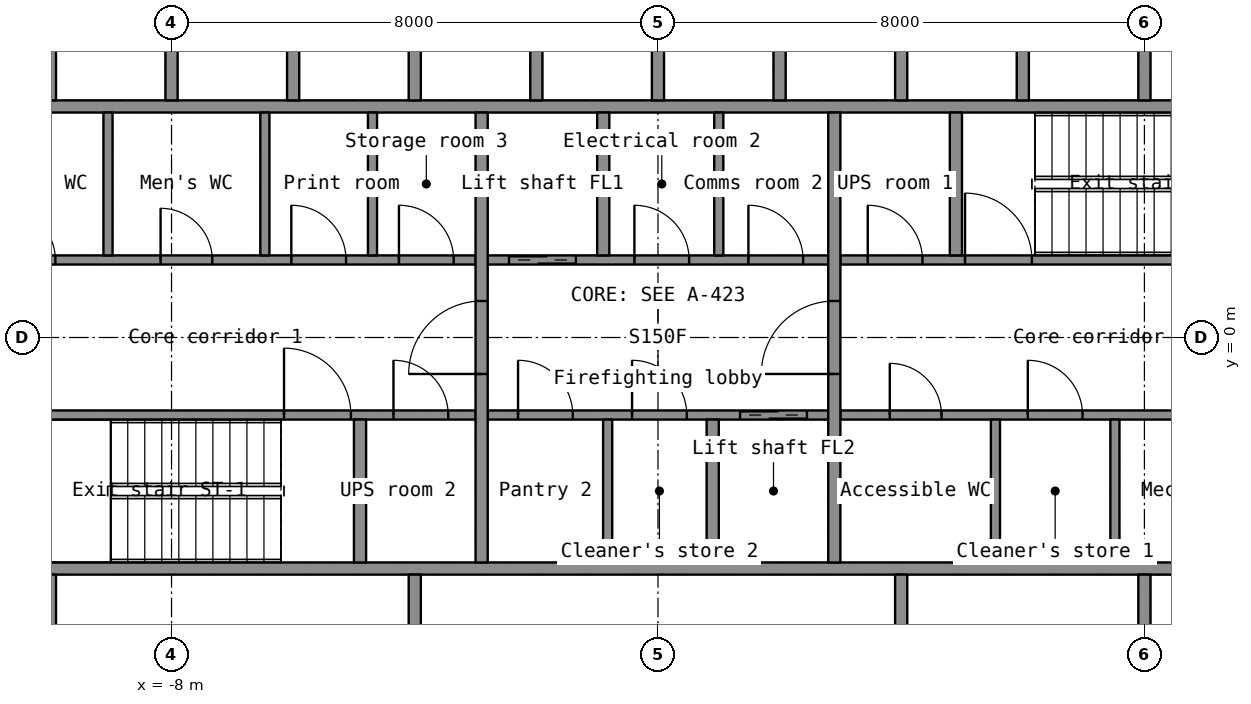
"""IFC4 building model, lengths in metres.
Left out: names, types, materials, properties, quantities, classifications, styles, units other than length and angle.
Written with IfcOpenShell. Run it as: python <this file> out.ifc"""

import sys

from ifc_helpers import new_model, si_unit, direction, frame, frame_2d, origin, place, context, subcontext, project, spatial, rectangle, extrude, element, fill, save


model = new_model("IFC4")
c1 = context("Model", 3, precision=1e-05, world=origin(), true_north=direction((0.0, 1.0)))
c2 = subcontext(c1, "Body", "Model", "MODEL_VIEW")
j1 = project(units=[si_unit("LENGTHUNIT", "METRE"), si_unit("PLANEANGLEUNIT", "RADIAN")], contexts=[c1])
p1 = place(None, origin())
s1 = spatial("IfcSite", under=j1, at=p1, CompositionType="ELEMENT")
p2 = place(p1, origin())
s2 = spatial("IfcBuilding", under=s1, at=p2, CompositionType="ELEMENT")
p3 = place(p2, frame((0.0, 0.0, 171.9)))
s3 = spatial("IfcBuildingStorey", under=s2, at=p3, CompositionType="ELEMENT", Elevation=171.9)
for number, where, z_axis, x_axis in (
    (1, (-11.55, -3.8, 0.0), (0.0, 0.0, 1.0), (1.0, 0.0, 0.0)),
    (2, (-11.55, 3.8, 0.0), (0.0, 0.0, 1.0), (1.0, 0.0, 0.0)),
):
    element("IfcWall", number, at=place(p3, frame(where, z_axis=z_axis, x_axis=x_axis)), inside=s3, PredefinedType="SHEAR", context=c2, shape_type="SweptSolid", body=[
        extrude(rectangle(XDim=23.1, YDim=0.2, at=frame_2d((11.55, 0.0))), origin(), (0.0, 0.0, 1.0), 3.3),
    ])
for number, where, z_axis, x_axis in (
    (3, (-10.0, -6.75, 0.0), (0.0, 0.0, 1.0), (0.0, 1.0, 0.0)),
    (4, (8.0, -6.75, 0.0), (0.0, 0.0, 1.0), (0.0, 1.0, 0.0)),
):
    element("IfcWall", number, at=place(p3, frame(where, z_axis=z_axis, x_axis=x_axis)), inside=s3, PredefinedType="SHEAR", context=c2, shape_type="SweptSolid", body=[
        extrude(rectangle(XDim=2.85, YDim=0.2, at=frame_2d((1.425, 0.0))), origin(), (0.0, 0.0, 1.0), 3.3),
    ])
for number, where, z_axis, x_axis in (
    (5, (-4.0, -6.75, 0.0), (0.0, 0.0, 1.0), (0.0, 1.0, 0.0)),
    (6, (4.0, -6.75, 0.0), (0.0, 0.0, 1.0), (0.0, 1.0, 0.0)),
):
    element("IfcWall", number, at=place(p3, frame(where, z_axis=z_axis, x_axis=x_axis)), inside=s3, PredefinedType="PARTITIONING", context=c2, shape_type="SweptSolid", body=[
        extrude(rectangle(XDim=2.85, YDim=0.2, at=frame_2d((1.425, 0.0))), origin(), (0.0, 0.0, 1.0), 3.3),
    ])
for number, where, z_axis, x_axis in (
    (7, (-10.0, 3.9, 0.0), (0.0, 0.0, 1.0), (0.0, 1.0, 0.0)),
    (8, (-8.0, 3.9, 0.0), (0.0, 0.0, 1.0), (0.0, 1.0, 0.0)),
    (9, (-6.0, 3.9, 0.0), (0.0, 0.0, 1.0), (0.0, 1.0, 0.0)),
    (10, (-4.0, 3.9, 0.0), (0.0, 0.0, 1.0), (0.0, 1.0, 0.0)),
    (11, (-2.0, 3.9, 0.0), (0.0, 0.0, 1.0), (0.0, 1.0, 0.0)),
    (12, (0.0, 3.9, 0.0), (0.0, 0.0, 1.0), (0.0, 1.0, 0.0)),
    (13, (2.0, 3.9, 0.0), (0.0, 0.0, 1.0), (0.0, 1.0, 0.0)),
    (14, (4.0, 3.9, 0.0), (0.0, 0.0, 1.0), (0.0, 1.0, 0.0)),
    (15, (6.0, 3.9, 0.0), (0.0, 0.0, 1.0), (0.0, 1.0, 0.0)),
    (16, (8.0, 3.9, 0.0), (0.0, 0.0, 1.0), (0.0, 1.0, 0.0)),
):
    element("IfcWall", number, at=place(p3, frame(where, z_axis=z_axis, x_axis=x_axis)), inside=s3, PredefinedType="SHEAR", context=c2, shape_type="SweptSolid", body=[
        extrude(rectangle(XDim=2.85, YDim=0.2, at=frame_2d((1.425, 0.0))), origin(), (0.0, 0.0, 1.0), 3.3),
    ])
p4 = place(p3, frame((-11.55, -1.275, 0.0), z_axis=(0.0, 0.0, 1.0), x_axis=(1.0, 0.0, 0.0)))
e17 = element("IfcWall", 17, at=p4, inside=s3, PredefinedType="SHEAR", context=c2, shape_type="SweptSolid", body=[
    extrude(rectangle(XDim=8.55, YDim=0.15, at=frame_2d((4.275, 0.0))), origin(), (0.0, 0.0, 1.0), 3.3),
])
p5 = place(p4, frame((5.4, 0.0, 0.0)))
e18 = element("IfcOpeningElement", 18, at=p5, cuts=e17, PredefinedType="OPENING", context=c2, shape_type="SweptSolid", body=[
    extrude(rectangle(XDim=1.1, YDim=2.15, at=frame_2d((0.55, 1.075))), frame((0.0, 0.085, 0.0), z_axis=(0.0, -1.0, 0.0), x_axis=(1.0, 0.0, 0.0)), (0.0, 0.0, 1.0), 0.17),
])
p6 = place(p4, frame((7.2, 0.0, 0.0)))
e19 = element("IfcOpeningElement", 19, at=p6, cuts=e17, PredefinedType="OPENING", context=c2, shape_type="SweptSolid", body=[
    extrude(rectangle(XDim=0.9, YDim=2.1, at=frame_2d((0.45, 1.05))), frame((0.0, 0.085, 0.0), z_axis=(0.0, -1.0, 0.0), x_axis=(1.0, 0.0, 0.0)), (0.0, 0.0, 1.0), 0.17),
])
p7 = place(p3, frame((-2.8, -1.275, 0.0), z_axis=(0.0, 0.0, 1.0), x_axis=(1.0, 0.0, 0.0)))
e20 = element("IfcWall", 20, at=p7, inside=s3, PredefinedType="SHEAR", context=c2, shape_type="SweptSolid", body=[
    extrude(rectangle(XDim=5.6, YDim=0.15, at=frame_2d((2.8, 0.0))), origin(), (0.0, 0.0, 1.0), 3.3),
])
p8 = place(p7, frame((4.15, 0.0, 0.0)))
e21 = element("IfcOpeningElement", 21, at=p8, cuts=e20, PredefinedType="OPENING", context=c2, shape_type="SweptSolid", body=[
    extrude(rectangle(XDim=1.1, YDim=2.2, at=frame_2d((0.55, 1.1))), frame((0.0, 0.085, 0.0), z_axis=(0.0, -1.0, 0.0), x_axis=(1.0, 0.0, 0.0)), (0.0, 0.0, 1.0), 0.17),
])
p9 = place(p7, frame((0.499, 0.0, 0.0)))
e22 = element("IfcOpeningElement", 22, at=p9, cuts=e20, PredefinedType="OPENING", context=c2, shape_type="SweptSolid", body=[
    extrude(rectangle(XDim=0.9, YDim=2.1, at=frame_2d((0.45, 1.05))), frame((0.0, 0.085, 0.0), z_axis=(0.0, -1.0, 0.0), x_axis=(1.0, 0.0, 0.0)), (0.0, 0.0, 1.0), 0.17),
])
p10 = place(p7, frame((2.374, 0.0, 0.0)))
e23 = element("IfcOpeningElement", 23, at=p10, cuts=e20, PredefinedType="OPENING", context=c2, shape_type="SweptSolid", body=[
    extrude(rectangle(XDim=0.9, YDim=2.1, at=frame_2d((0.45, 1.05))), frame((0.0, 0.085, 0.0), z_axis=(0.0, -1.0, 0.0), x_axis=(1.0, 0.0, 0.0)), (0.0, 0.0, 1.0), 0.17),
])
p11 = place(p3, frame((3.0, -1.275, 0.0), z_axis=(0.0, 0.0, 1.0), x_axis=(1.0, 0.0, 0.0)))
e24 = element("IfcWall", 24, at=p11, inside=s3, PredefinedType="PARTITIONING", context=c2, shape_type="SweptSolid", body=[
    extrude(rectangle(XDim=8.55, YDim=0.15, at=frame_2d((4.275, 0.0))), origin(), (0.0, 0.0, 1.0), 3.3),
])
p12 = place(p11, frame((0.812, 0.0, 0.0)))
e25 = element("IfcOpeningElement", 25, at=p12, cuts=e24, PredefinedType="OPENING", context=c2, shape_type="SweptSolid", body=[
    extrude(rectangle(XDim=0.85, YDim=2.1, at=frame_2d((0.425, 1.05))), frame((0.0, 0.085, 0.0), z_axis=(0.0, -1.0, 0.0), x_axis=(1.0, 0.0, 0.0)), (0.0, 0.0, 1.0), 0.17),
])
p13 = place(p11, frame((3.083, 0.0, 0.0)))
e26 = element("IfcOpeningElement", 26, at=p13, cuts=e24, PredefinedType="OPENING", context=c2, shape_type="SweptSolid", body=[
    extrude(rectangle(XDim=0.9, YDim=2.1, at=frame_2d((0.45, 1.05))), frame((0.0, 0.085, 0.0), z_axis=(0.0, -1.0, 0.0), x_axis=(1.0, 0.0, 0.0)), (0.0, 0.0, 1.0), 0.17),
])
p14 = place(p11, frame((6.12, 0.0, 0.0)))
e27 = element("IfcOpeningElement", 27, at=p14, cuts=e24, PredefinedType="OPENING", context=c2, shape_type="SweptSolid", body=[
    extrude(rectangle(XDim=0.9, YDim=2.1, at=frame_2d((0.45, 1.05))), frame((0.0, 0.085, 0.0), z_axis=(0.0, -1.0, 0.0), x_axis=(1.0, 0.0, 0.0)), (0.0, 0.0, 1.0), 0.17),
])
p15 = place(p3, frame((-11.55, 1.275, 0.0), z_axis=(0.0, 0.0, 1.0), x_axis=(1.0, 0.0, 0.0)))
e28 = element("IfcWall", 28, at=p15, inside=s3, PredefinedType="PARTITIONING", context=c2, shape_type="SweptSolid", body=[
    extrude(rectangle(XDim=8.55, YDim=0.15, at=frame_2d((4.275, 0.0))), origin(), (0.0, 0.0, 1.0), 3.3),
])
p16 = place(p15, frame((0.79, 0.0, 0.0)))
e29 = element("IfcOpeningElement", 29, at=p16, cuts=e28, PredefinedType="OPENING", context=c2, shape_type="SweptSolid", body=[
    extrude(rectangle(XDim=0.85, YDim=2.1, at=frame_2d((0.425, 1.05))), frame((0.0, 0.085, 0.0), z_axis=(0.0, -1.0, 0.0), x_axis=(1.0, 0.0, 0.0)), (0.0, 0.0, 1.0), 0.17),
])
p17 = place(p15, frame((3.37, 0.0, 0.0)))
e30 = element("IfcOpeningElement", 30, at=p17, cuts=e28, PredefinedType="OPENING", context=c2, shape_type="SweptSolid", body=[
    extrude(rectangle(XDim=0.85, YDim=2.1, at=frame_2d((0.425, 1.05))), frame((0.0, 0.085, 0.0), z_axis=(0.0, -1.0, 0.0), x_axis=(1.0, 0.0, 0.0)), (0.0, 0.0, 1.0), 0.17),
])
p18 = place(p15, frame((5.52, 0.0, 0.0)))
e31 = element("IfcOpeningElement", 31, at=p18, cuts=e28, PredefinedType="OPENING", context=c2, shape_type="SweptSolid", body=[
    extrude(rectangle(XDim=0.9, YDim=2.1, at=frame_2d((0.45, 1.05))), frame((0.0, 0.085, 0.0), z_axis=(0.0, -1.0, 0.0), x_axis=(1.0, 0.0, 0.0)), (0.0, 0.0, 1.0), 0.17),
])
p19 = place(p15, frame((7.29, 0.0, 0.0)))
e32 = element("IfcOpeningElement", 32, at=p19, cuts=e28, PredefinedType="OPENING", context=c2, shape_type="SweptSolid", body=[
    extrude(rectangle(XDim=0.9, YDim=2.1, at=frame_2d((0.45, 1.05))), frame((0.0, 0.085, 0.0), z_axis=(0.0, -1.0, 0.0), x_axis=(1.0, 0.0, 0.0)), (0.0, 0.0, 1.0), 0.17),
])
p20 = place(p3, frame((-2.8, 1.275, 0.0), z_axis=(0.0, 0.0, 1.0), x_axis=(1.0, 0.0, 0.0)))
e33 = element("IfcWall", 33, at=p20, inside=s3, PredefinedType="SHEAR", context=c2, shape_type="SweptSolid", body=[
    extrude(rectangle(XDim=5.6, YDim=0.15, at=frame_2d((2.8, 0.0))), origin(), (0.0, 0.0, 1.0), 3.3),
])
p21 = place(p20, frame((0.35, 0.0, 0.0)))
e34 = element("IfcOpeningElement", 34, at=p21, cuts=e33, PredefinedType="OPENING", context=c2, shape_type="SweptSolid", body=[
    extrude(rectangle(XDim=1.1, YDim=2.2, at=frame_2d((0.55, 1.1))), frame((0.0, 0.085, 0.0), z_axis=(0.0, -1.0, 0.0), x_axis=(1.0, 0.0, 0.0)), (0.0, 0.0, 1.0), 0.17),
])
p22 = place(p20, frame((2.413, 0.0, 0.0)))
e35 = element("IfcOpeningElement", 35, at=p22, cuts=e33, PredefinedType="OPENING", context=c2, shape_type="SweptSolid", body=[
    extrude(rectangle(XDim=0.9, YDim=2.1, at=frame_2d((0.45, 1.05))), frame((0.0, 0.085, 0.0), z_axis=(0.0, -1.0, 0.0), x_axis=(1.0, 0.0, 0.0)), (0.0, 0.0, 1.0), 0.17),
])
p23 = place(p20, frame((4.288, 0.0, 0.0)))
e36 = element("IfcOpeningElement", 36, at=p23, cuts=e33, PredefinedType="OPENING", context=c2, shape_type="SweptSolid", body=[
    extrude(rectangle(XDim=0.9, YDim=2.1, at=frame_2d((0.45, 1.05))), frame((0.0, 0.085, 0.0), z_axis=(0.0, -1.0, 0.0), x_axis=(1.0, 0.0, 0.0)), (0.0, 0.0, 1.0), 0.17),
])
p24 = place(p3, frame((3.0, 1.275, 0.0), z_axis=(0.0, 0.0, 1.0), x_axis=(1.0, 0.0, 0.0)))
e37 = element("IfcWall", 37, at=p24, inside=s3, PredefinedType="SHEAR", context=c2, shape_type="SweptSolid", body=[
    extrude(rectangle(XDim=8.55, YDim=0.15, at=frame_2d((4.275, 0.0))), origin(), (0.0, 0.0, 1.0), 3.3),
])
p25 = place(p24, frame((2.05, 0.0, 0.0)))
e38 = element("IfcOpeningElement", 38, at=p25, cuts=e37, PredefinedType="OPENING", context=c2, shape_type="SweptSolid", body=[
    extrude(rectangle(XDim=1.1, YDim=2.15, at=frame_2d((0.55, 1.075))), frame((0.0, 0.085, 0.0), z_axis=(0.0, -1.0, 0.0), x_axis=(1.0, 0.0, 0.0)), (0.0, 0.0, 1.0), 0.17),
])
p26 = place(p24, frame((0.45, 0.0, 0.0)))
e39 = element("IfcOpeningElement", 39, at=p26, cuts=e37, PredefinedType="OPENING", context=c2, shape_type="SweptSolid", body=[
    extrude(rectangle(XDim=0.9, YDim=2.1, at=frame_2d((0.45, 1.05))), frame((0.0, 0.085, 0.0), z_axis=(0.0, -1.0, 0.0), x_axis=(1.0, 0.0, 0.0)), (0.0, 0.0, 1.0), 0.17),
])
p27 = place(p3, frame((-2.9, -3.7, 0.0), z_axis=(0.0, 0.0, 1.0), x_axis=(0.0, 1.0, 0.0)))
e40 = element("IfcWall", 40, at=p27, inside=s3, PredefinedType="SHEAR", context=c2, shape_type="SweptSolid", body=[
    extrude(rectangle(XDim=7.4, YDim=0.2, at=frame_2d((3.7, 0.0))), origin(), (0.0, 0.0, 1.0), 3.3),
])
p28 = place(p27, frame((3.1, 0.0, 0.0)))
e41 = element("IfcOpeningElement", 41, at=p28, cuts=e40, PredefinedType="OPENING", context=c2, shape_type="SweptSolid", body=[
    extrude(rectangle(XDim=1.2, YDim=2.2, at=frame_2d((0.6, 1.1))), frame((0.0, 0.11, 0.0), z_axis=(0.0, -1.0, 0.0), x_axis=(1.0, 0.0, 0.0)), (0.0, 0.0, 1.0), 0.22),
])
p29 = place(p3, frame((2.9, -3.7, 0.0), z_axis=(0.0, 0.0, 1.0), x_axis=(0.0, 1.0, 0.0)))
e42 = element("IfcWall", 42, at=p29, inside=s3, PredefinedType="SHEAR", context=c2, shape_type="SweptSolid", body=[
    extrude(rectangle(XDim=7.4, YDim=0.2, at=frame_2d((3.7, 0.0))), origin(), (0.0, 0.0, 1.0), 3.3),
])
p30 = place(p29, frame((3.1, 0.0, 0.0)))
e43 = element("IfcOpeningElement", 43, at=p30, cuts=e42, PredefinedType="OPENING", context=c2, shape_type="SweptSolid", body=[
    extrude(rectangle(XDim=1.2, YDim=2.2, at=frame_2d((0.6, 1.1))), frame((0.0, 0.11, 0.0), z_axis=(0.0, -1.0, 0.0), x_axis=(1.0, 0.0, 0.0)), (0.0, 0.0, 1.0), 0.22),
])
for number, where, z_axis, x_axis in (
    (44, (-0.9, 1.35, 0.0), (0.0, 0.0, 1.0), (0.0, 1.0, 0.0)),
    (45, (0.9, -3.7, 0.0), (0.0, 0.0, 1.0), (0.0, 1.0, 0.0)),
    (46, (-4.9, -3.7, 0.0), (0.0, 0.0, 1.0), (0.0, 1.0, 0.0)),
    (47, (4.9, 1.35, 0.0), (0.0, 0.0, 1.0), (0.0, 1.0, 0.0)),
):
    element("IfcWall", number, at=place(p3, frame(where, z_axis=z_axis, x_axis=x_axis)), inside=s3, PredefinedType="SHEAR", context=c2, shape_type="SweptSolid", body=[
        extrude(rectangle(XDim=2.35, YDim=0.2, at=frame_2d((1.175, 0.0))), origin(), (0.0, 0.0, 1.0), 3.3),
    ])
for number, where, z_axis, x_axis in (
    (48, (-9.045, 1.35, 0.0), (0.0, 0.0, 1.0), (0.0, 1.0, 0.0)),
    (49, (-6.465, 1.35, 0.0), (0.0, 0.0, 1.0), (0.0, 1.0, 0.0)),
    (50, (-4.695, 1.35, 0.0), (0.0, 0.0, 1.0), (0.0, 1.0, 0.0)),
    (51, (5.55, -3.7, 0.0), (0.0, 0.0, 1.0), (0.0, 1.0, 0.0)),
    (52, (7.515, -3.7, 0.0), (0.0, 0.0, 1.0), (0.0, 1.0, 0.0)),
    (53, (1.0, 1.35, 0.0), (0.0, 0.0, 1.0), (0.0, 1.0, 0.0)),
    (54, (-0.827, -3.7, 0.0), (0.0, 0.0, 1.0), (0.0, 1.0, 0.0)),
):
    element("IfcWall", number, at=place(p3, frame(where, z_axis=z_axis, x_axis=x_axis)), inside=s3, PredefinedType="PARTITIONING", context=c2, shape_type="SweptSolid", body=[
        extrude(rectangle(XDim=2.35, YDim=0.15, at=frame_2d((1.175, 0.0))), origin(), (0.0, 0.0, 1.0), 3.3),
    ])
p31 = place(p28, origin())
e55 = element("IfcDoor", 55, at=p31, inside=s3, OperationType="SINGLE_SWING_LEFT", PredefinedType="DOOR", context=c2, shape_type="SweptSolid", body=[
    extrude(rectangle(XDim=1.2, YDim=2.2, at=frame_2d((0.6, 1.1))), frame((0.0, 0.025, 0.0), z_axis=(0.0, -1.0, 0.0), x_axis=(1.0, 0.0, 0.0)), (0.0, 0.0, 1.0), 0.05),
])
fill(e41, e55)
p32 = place(p30, origin())
e56 = element("IfcDoor", 56, at=p32, inside=s3, OperationType="SINGLE_SWING_LEFT", PredefinedType="DOOR", context=c2, shape_type="SweptSolid", body=[
    extrude(rectangle(XDim=1.2, YDim=2.2, at=frame_2d((0.6, 1.1))), frame((0.0, 0.025, 0.0), z_axis=(0.0, -1.0, 0.0), x_axis=(1.0, 0.0, 0.0)), (0.0, 0.0, 1.0), 0.05),
])
fill(e43, e56)
p33 = place(p21, origin())
e57 = element("IfcDoor", 57, at=p33, inside=s3, OperationType="DOUBLE_DOOR_SLIDING", PredefinedType="DOOR", context=c2, shape_type="SweptSolid", body=[
    extrude(rectangle(XDim=1.1, YDim=2.2, at=frame_2d((0.55, 1.1))), frame((0.0, 0.025, 0.0), z_axis=(0.0, -1.0, 0.0), x_axis=(1.0, 0.0, 0.0)), (0.0, 0.0, 1.0), 0.05),
])
fill(e34, e57)
p34 = place(p8, origin())
e58 = element("IfcDoor", 58, at=p34, inside=s3, OperationType="DOUBLE_DOOR_SLIDING", PredefinedType="DOOR", context=c2, shape_type="SweptSolid", body=[
    extrude(rectangle(XDim=1.1, YDim=2.2, at=frame_2d((0.55, 1.1))), frame((0.0, 0.025, 0.0), z_axis=(0.0, -1.0, 0.0), x_axis=(1.0, 0.0, 0.0)), (0.0, 0.0, 1.0), 0.05),
])
fill(e21, e58)
p35 = place(p5, origin())
e59 = element("IfcDoor", 59, at=p35, inside=s3, OperationType="SINGLE_SWING_LEFT", PredefinedType="DOOR", context=c2, shape_type="SweptSolid", body=[
    extrude(rectangle(XDim=1.1, YDim=2.15, at=frame_2d((0.55, 1.075))), frame((0.0, 0.025, 0.0), z_axis=(0.0, -1.0, 0.0), x_axis=(1.0, 0.0, 0.0)), (0.0, 0.0, 1.0), 0.05),
])
fill(e18, e59)
p36 = place(p25, origin())
e60 = element("IfcDoor", 60, at=p36, inside=s3, OperationType="SINGLE_SWING_LEFT", PredefinedType="DOOR", context=c2, shape_type="SweptSolid", body=[
    extrude(rectangle(XDim=1.1, YDim=2.15, at=frame_2d((0.55, 1.075))), frame((0.0, 0.025, 0.0), z_axis=(0.0, -1.0, 0.0), x_axis=(1.0, 0.0, 0.0)), (0.0, 0.0, 1.0), 0.05),
])
fill(e38, e60)
p37 = place(p16, origin())
e61 = element("IfcDoor", 61, at=p37, inside=s3, OperationType="SINGLE_SWING_LEFT", PredefinedType="DOOR", context=c2, shape_type="SweptSolid", body=[
    extrude(rectangle(XDim=0.85, YDim=2.1, at=frame_2d((0.425, 1.05))), frame((0.0, 0.025, 0.0), z_axis=(0.0, -1.0, 0.0), x_axis=(1.0, 0.0, 0.0)), (0.0, 0.0, 1.0), 0.05),
])
fill(e29, e61)
p38 = place(p17, origin())
e62 = element("IfcDoor", 62, at=p38, inside=s3, OperationType="SINGLE_SWING_LEFT", PredefinedType="DOOR", context=c2, shape_type="SweptSolid", body=[
    extrude(rectangle(XDim=0.85, YDim=2.1, at=frame_2d((0.425, 1.05))), frame((0.0, 0.025, 0.0), z_axis=(0.0, -1.0, 0.0), x_axis=(1.0, 0.0, 0.0)), (0.0, 0.0, 1.0), 0.05),
])
fill(e30, e62)
p39 = place(p18, origin())
e63 = element("IfcDoor", 63, at=p39, inside=s3, OperationType="SINGLE_SWING_LEFT", PredefinedType="DOOR", context=c2, shape_type="SweptSolid", body=[
    extrude(rectangle(XDim=0.9, YDim=2.1, at=frame_2d((0.45, 1.05))), frame((0.0, 0.025, 0.0), z_axis=(0.0, -1.0, 0.0), x_axis=(1.0, 0.0, 0.0)), (0.0, 0.0, 1.0), 0.05),
])
fill(e31, e63)
p40 = place(p19, origin())
e64 = element("IfcDoor", 64, at=p40, inside=s3, OperationType="SINGLE_SWING_LEFT", PredefinedType="DOOR", context=c2, shape_type="SweptSolid", body=[
    extrude(rectangle(XDim=0.9, YDim=2.1, at=frame_2d((0.45, 1.05))), frame((0.0, 0.025, 0.0), z_axis=(0.0, -1.0, 0.0), x_axis=(1.0, 0.0, 0.0)), (0.0, 0.0, 1.0), 0.05),
])
fill(e32, e64)
p41 = place(p12, origin())
e65 = element("IfcDoor", 65, at=p41, inside=s3, OperationType="SINGLE_SWING_LEFT", PredefinedType="DOOR", context=c2, shape_type="SweptSolid", body=[
    extrude(rectangle(XDim=0.85, YDim=2.1, at=frame_2d((0.425, 1.05))), frame((0.0, 0.025, 0.0), z_axis=(0.0, -1.0, 0.0), x_axis=(1.0, 0.0, 0.0)), (0.0, 0.0, 1.0), 0.05),
])
fill(e25, e65)
p42 = place(p13, origin())
e66 = element("IfcDoor", 66, at=p42, inside=s3, OperationType="SINGLE_SWING_LEFT", PredefinedType="DOOR", context=c2, shape_type="SweptSolid", body=[
    extrude(rectangle(XDim=0.9, YDim=2.1, at=frame_2d((0.45, 1.05))), frame((0.0, 0.025, 0.0), z_axis=(0.0, -1.0, 0.0), x_axis=(1.0, 0.0, 0.0)), (0.0, 0.0, 1.0), 0.05),
])
fill(e26, e66)
p43 = place(p22, origin())
e67 = element("IfcDoor", 67, at=p43, inside=s3, OperationType="SINGLE_SWING_LEFT", PredefinedType="DOOR", context=c2, shape_type="SweptSolid", body=[
    extrude(rectangle(XDim=0.9, YDim=2.1, at=frame_2d((0.45, 1.05))), frame((0.0, 0.025, 0.0), z_axis=(0.0, -1.0, 0.0), x_axis=(1.0, 0.0, 0.0)), (0.0, 0.0, 1.0), 0.05),
])
fill(e35, e67)
p44 = place(p23, origin())
e68 = element("IfcDoor", 68, at=p44, inside=s3, OperationType="SINGLE_SWING_LEFT", PredefinedType="DOOR", context=c2, shape_type="SweptSolid", body=[
    extrude(rectangle(XDim=0.9, YDim=2.1, at=frame_2d((0.45, 1.05))), frame((0.0, 0.025, 0.0), z_axis=(0.0, -1.0, 0.0), x_axis=(1.0, 0.0, 0.0)), (0.0, 0.0, 1.0), 0.05),
])
fill(e36, e68)
p45 = place(p9, origin())
e69 = element("IfcDoor", 69, at=p45, inside=s3, OperationType="SINGLE_SWING_LEFT", PredefinedType="DOOR", context=c2, shape_type="SweptSolid", body=[
    extrude(rectangle(XDim=0.9, YDim=2.1, at=frame_2d((0.45, 1.05))), frame((0.0, 0.025, 0.0), z_axis=(0.0, -1.0, 0.0), x_axis=(1.0, 0.0, 0.0)), (0.0, 0.0, 1.0), 0.05),
])
fill(e22, e69)
p46 = place(p10, origin())
e70 = element("IfcDoor", 70, at=p46, inside=s3, OperationType="SINGLE_SWING_LEFT", PredefinedType="DOOR", context=c2, shape_type="SweptSolid", body=[
    extrude(rectangle(XDim=0.9, YDim=2.1, at=frame_2d((0.45, 1.05))), frame((0.0, 0.025, 0.0), z_axis=(0.0, -1.0, 0.0), x_axis=(1.0, 0.0, 0.0)), (0.0, 0.0, 1.0), 0.05),
])
fill(e23, e70)
p47 = place(p26, origin())
e71 = element("IfcDoor", 71, at=p47, inside=s3, OperationType="SINGLE_SWING_LEFT", PredefinedType="DOOR", context=c2, shape_type="SweptSolid", body=[
    extrude(rectangle(XDim=0.9, YDim=2.1, at=frame_2d((0.45, 1.05))), frame((0.0, 0.025, 0.0), z_axis=(0.0, -1.0, 0.0), x_axis=(1.0, 0.0, 0.0)), (0.0, 0.0, 1.0), 0.05),
])
fill(e39, e71)
p48 = place(p6, origin())
e72 = element("IfcDoor", 72, at=p48, inside=s3, OperationType="SINGLE_SWING_LEFT", PredefinedType="DOOR", context=c2, shape_type="SweptSolid", body=[
    extrude(rectangle(XDim=0.9, YDim=2.1, at=frame_2d((0.45, 1.05))), frame((0.0, 0.025, 0.0), z_axis=(0.0, -1.0, 0.0), x_axis=(1.0, 0.0, 0.0)), (0.0, 0.0, 1.0), 0.05),
])
fill(e19, e72)
save(model, sys.argv[1])
